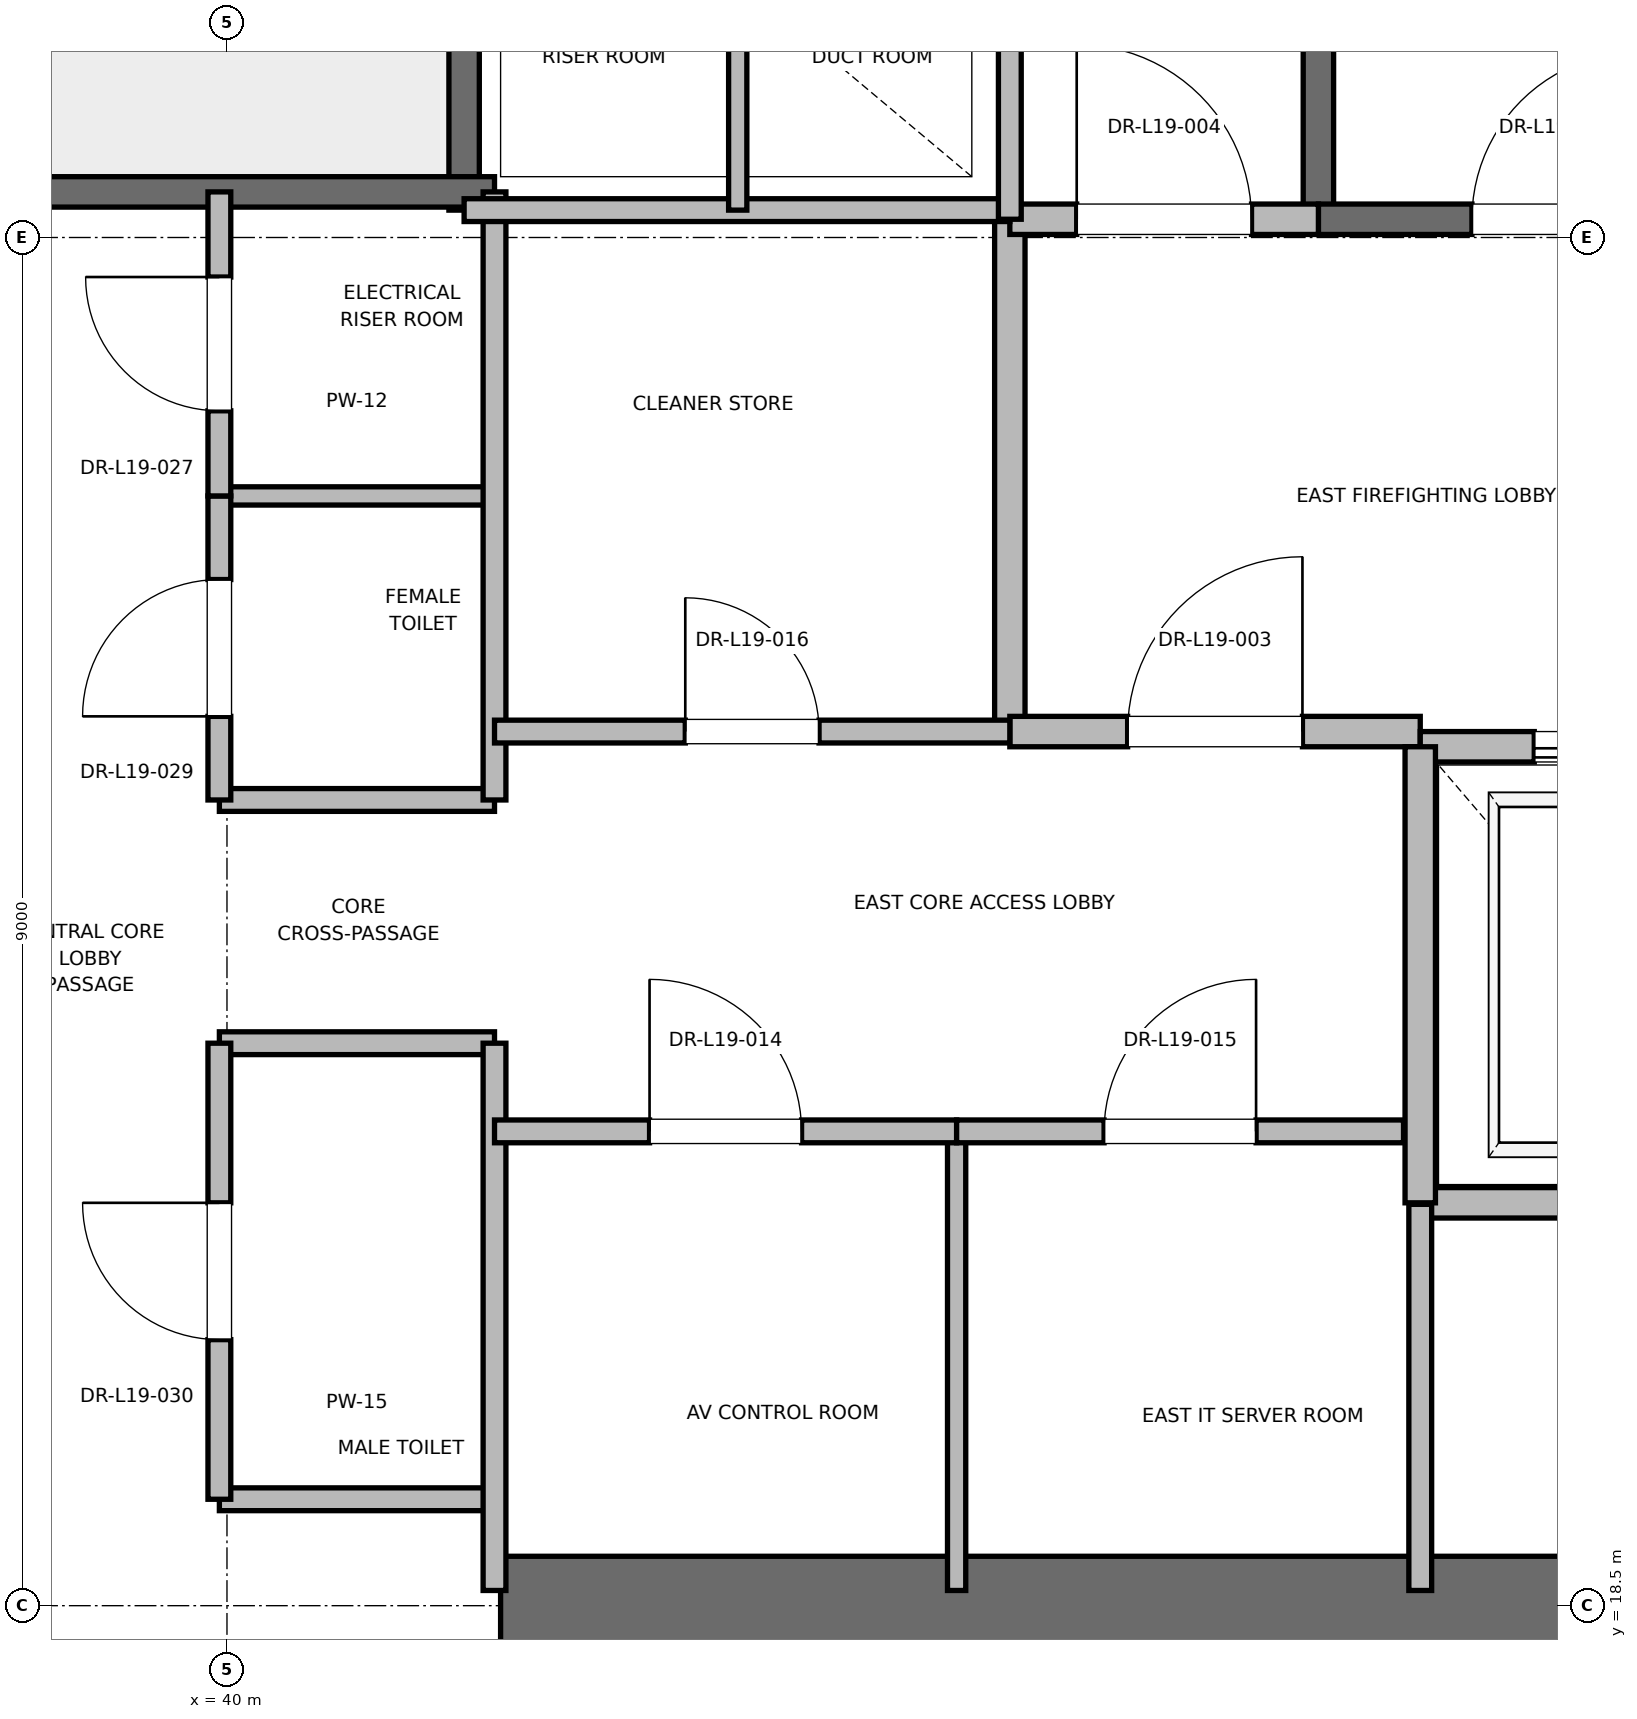
"""IFC4 building model, lengths in metres.
Left out: names, types, materials, properties, quantities, classifications, styles, units other than length and angle.
Written with IfcOpenShell. Run it as: python <this file> out.ifc"""

import sys

from ifc_helpers import new_model, si_unit, direction, frame, frame_2d, origin, place, context, subcontext, project, spatial, rectangle, extrude, element, fill, save


model = new_model("IFC4")
c1 = context("Model", 3, precision=1e-05, world=origin(), true_north=direction((0.0, 1.0)))
c2 = subcontext(c1, "Body", "Model", "MODEL_VIEW")
j1 = project(units=[si_unit("LENGTHUNIT", "METRE"), si_unit("PLANEANGLEUNIT", "RADIAN")], contexts=[c1])
p1 = place(None, origin())
s1 = spatial("IfcSite", under=j1, at=p1, CompositionType="ELEMENT")
p2 = place(p1, origin())
s2 = spatial("IfcBuilding", under=s1, at=p2, CompositionType="ELEMENT")
p3 = place(p2, frame((0.0, 0.0, 83.6)))
s3 = spatial("IfcBuildingStorey", under=s2, at=p3, CompositionType="ELEMENT", Elevation=83.6)
p4 = place(p3, frame((41.8, 18.5, 0.0), z_axis=(0.0, 0.0, 1.0), x_axis=(1.0, 0.0, 0.0)))
e1 = element("IfcWall", 1, at=p4, inside=s3, PredefinedType="SHEAR", context=c2, shape_type="SweptSolid", body=[
    extrude(rectangle(XDim=9.2, YDim=0.65, at=frame_2d((4.6, 0.0))), origin(), (0.0, 0.0, 1.0), 3.76),
])
p5 = place(p3, frame((47.18, 27.62, 0.0), z_axis=(0.0, 0.0, 1.0), x_axis=(0.0, 1.0, 0.0)))
e2 = element("IfcWall", 2, at=p5, inside=s3, PredefinedType="SOLIDWALL", context=c2, shape_type="SweptSolid", body=[
    extrude(rectangle(XDim=8.18, YDim=0.2, at=frame_2d((4.09, 0.0))), origin(), (0.0, 0.0, 1.0), 3.76),
])
p6 = place(p3, frame((47.18, 27.62, 0.0), z_axis=(0.0, 0.0, 1.0), x_axis=(1.0, 0.0, 0.0)))
e3 = element("IfcWall", 3, at=p6, inside=s3, PredefinedType="SOLIDWALL", context=c2, shape_type="SweptSolid", body=[
    extrude(rectangle(XDim=3.12, YDim=0.2, at=frame_2d((1.56, 0.0))), origin(), (0.0, 0.0, 1.0), 3.76),
])
p7 = place(p6, frame((1.01, 0.0, 0.0)))
e4 = element("IfcOpeningElement", 4, at=p7, cuts=e3, PredefinedType="OPENING", context=c2, shape_type="SweptSolid", body=[
    extrude(rectangle(XDim=1.1, YDim=2.15, at=frame_2d((0.55, 1.075))), frame((0.0, 0.1, 0.0), z_axis=(0.0, -1.0, 0.0), x_axis=(1.0, 0.0, 0.0)), (0.0, 0.0, 1.0), 0.2),
])
p8 = place(p3, frame((41.56, 27.68, 0.0), z_axis=(0.0, 0.0, 1.0), x_axis=(0.0, 1.0, 0.0)))
e5 = element("IfcWall", 5, at=p8, inside=s3, PredefinedType="SOLIDWALL", context=c2, shape_type="SweptSolid", body=[
    extrude(rectangle(XDim=8.57, YDim=0.2, at=frame_2d((4.285, 0.0))), origin(), (0.0, 0.0, 1.0), 3.76),
])
p9 = place(p3, frame((38.44, 27.8, 0.0), z_axis=(0.0, 0.0, 1.0), x_axis=(1.0, 0.0, 0.0)))
e6 = element("IfcWall", 6, at=p9, inside=s3, PredefinedType="SOLIDWALL", context=c2, shape_type="SweptSolid", body=[
    extrude(rectangle(XDim=3.32, YDim=0.2, at=frame_2d((1.66, 0.0))), origin(), (0.0, 0.0, 1.0), 3.76),
])
p10 = place(p3, frame((45.15, 24.25, 0.0), z_axis=(0.0, 0.0, 1.0), x_axis=(0.0, 1.0, 0.0)))
e7 = element("IfcWall", 7, at=p10, inside=s3, PredefinedType="PARTITIONING", context=c2, shape_type="SweptSolid", body=[
    extrude(rectangle(XDim=3.37, YDim=0.2, at=frame_2d((1.685, 0.0))), origin(), (0.0, 0.0, 1.0), 3.76),
])
p11 = place(p3, frame((45.15, 24.25, 0.0), z_axis=(0.0, 0.0, 1.0), x_axis=(1.0, 0.0, 0.0)))
e8 = element("IfcWall", 8, at=p11, inside=s3, PredefinedType="PARTITIONING", context=c2, shape_type="SweptSolid", body=[
    extrude(rectangle(XDim=2.7, YDim=0.2, at=frame_2d((1.35, 0.0))), origin(), (0.0, 0.0, 1.0), 3.76),
])
p12 = place(p11, frame((0.775, 0.0, 0.0)))
e9 = element("IfcOpeningElement", 9, at=p12, cuts=e8, PredefinedType="OPENING", context=c2, shape_type="SweptSolid", body=[
    extrude(rectangle(XDim=1.15, YDim=2.2, at=frame_2d((0.575, 1.1))), frame((0.0, 0.1, 0.0), z_axis=(0.0, -1.0, 0.0), x_axis=(1.0, 0.0, 0.0)), (0.0, 0.0, 1.0), 0.2),
])
p13 = place(p3, frame((45.15, 27.62, 0.0), z_axis=(0.0, 0.0, 1.0), x_axis=(1.0, 0.0, 0.0)))
e10 = element("IfcWall", 10, at=p13, inside=s3, PredefinedType="PARTITIONING", context=c2, shape_type="SweptSolid", body=[
    extrude(rectangle(XDim=2.03, YDim=0.2, at=frame_2d((1.015, 0.0))), origin(), (0.0, 0.0, 1.0), 3.76),
])
p14 = place(p13, frame((0.44, 0.0, 0.0)))
e11 = element("IfcOpeningElement", 11, at=p14, cuts=e10, PredefinedType="OPENING", context=c2, shape_type="SweptSolid", body=[
    extrude(rectangle(XDim=1.15, YDim=2.2, at=frame_2d((0.575, 1.1))), frame((0.0, 0.1, 0.0), z_axis=(0.0, -1.0, 0.0), x_axis=(1.0, 0.0, 0.0)), (0.0, 0.0, 1.0), 0.2),
])
p15 = place(p3, frame((47.85, 21.15, 0.0), z_axis=(0.0, 0.0, 1.0), x_axis=(1.0, 0.0, 0.0)))
e12 = element("IfcWall", 12, at=p15, inside=s3, PredefinedType="SOLIDWALL", context=c2, shape_type="SweptSolid", body=[
    extrude(rectangle(XDim=2.6, YDim=0.2, at=frame_2d((1.3, 0.0))), origin(), (0.0, 0.0, 1.0), 3.76),
])
p16 = place(p3, frame((50.45, 24.15, 0.0), z_axis=(0.0, 0.0, 1.0), x_axis=(-1.0, 0.0, 0.0)))
e13 = element("IfcWall", 13, at=p16, inside=s3, PredefinedType="SOLIDWALL", context=c2, shape_type="SweptSolid", body=[
    extrude(rectangle(XDim=2.6, YDim=0.2, at=frame_2d((1.3, 0.0))), origin(), (0.0, 0.0, 1.0), 2.54),
])
p17 = place(p16, frame((0.75, 0.0, 0.0)))
e14 = element("IfcOpeningElement", 14, at=p17, cuts=e13, PredefinedType="OPENING", context=c2, shape_type="SweptSolid", body=[
    extrude(rectangle(XDim=1.1, YDim=2.2, at=frame_2d((0.55, 1.1))), frame((0.0, 0.1, 0.0), z_axis=(0.0, -1.0, 0.0), x_axis=(1.0, 0.0, 0.0)), (0.0, 0.0, 1.0), 0.2),
])
p18 = place(p3, frame((47.85, 24.15, 0.0), z_axis=(0.0, 0.0, 1.0), x_axis=(0.0, -1.0, 0.0)))
e15 = element("IfcWall", 15, at=p18, inside=s3, PredefinedType="SOLIDWALL", context=c2, shape_type="SweptSolid", body=[
    extrude(rectangle(XDim=3.0, YDim=0.2, at=frame_2d((1.5, 0.0))), origin(), (0.0, 0.0, 1.0), 3.76),
])
for number, where, z_axis, x_axis in (
    (16, (39.95, 19.2, 0.0), (0.0, 0.0, 1.0), (1.0, 0.0, 0.0)),
    (17, (39.95, 22.2, 0.0), (0.0, 0.0, 1.0), (1.0, 0.0, 0.0)),
    (18, (39.95, 23.8, 0.0), (0.0, 0.0, 1.0), (1.0, 0.0, 0.0)),
):
    element("IfcWall", number, at=place(p3, frame(where, z_axis=z_axis, x_axis=x_axis)), inside=s3, PredefinedType="PARTITIONING", context=c2, shape_type="SweptSolid", body=[
        extrude(rectangle(XDim=1.81, YDim=0.15, at=frame_2d((0.905, 0.0))), origin(), (0.0, 0.0, 1.0), 2.85),
    ])
p19 = place(p3, frame((39.95, 25.8, 0.0), z_axis=(0.0, 0.0, 1.0), x_axis=(1.0, 0.0, 0.0)))
e19 = element("IfcWall", 19, at=p19, inside=s3, PredefinedType="PARTITIONING", context=c2, shape_type="SweptSolid", body=[
    extrude(rectangle(XDim=1.81, YDim=0.12, at=frame_2d((0.905, 0.0))), origin(), (0.0, 0.0, 1.0), 2.85),
])
p20 = place(p3, frame((41.76, 18.6, 0.0), z_axis=(0.0, 0.0, 1.0), x_axis=(0.0, 1.0, 0.0)))
e20 = element("IfcWall", 20, at=p20, inside=s3, PredefinedType="PARTITIONING", context=c2, shape_type="SweptSolid", body=[
    extrude(rectangle(XDim=3.6, YDim=0.15, at=frame_2d((1.8, 0.0))), origin(), (0.0, 0.0, 1.0), 2.54),
])
p21 = place(p3, frame((41.76, 23.8, 0.0), z_axis=(0.0, 0.0, 1.0), x_axis=(0.0, 1.0, 0.0)))
e21 = element("IfcWall", 21, at=p21, inside=s3, PredefinedType="PARTITIONING", context=c2, shape_type="SweptSolid", body=[
    extrude(rectangle(XDim=4.0, YDim=0.15, at=frame_2d((2.0, 0.0))), origin(), (0.0, 0.0, 1.0), 2.85),
])
p22 = place(p3, frame((39.95, 19.2, 0.0), z_axis=(0.0, 0.0, 1.0), x_axis=(0.0, 1.0, 0.0)))
e22 = element("IfcWall", 22, at=p22, inside=s3, PredefinedType="PARTITIONING", context=c2, shape_type="SweptSolid", body=[
    extrude(rectangle(XDim=3.0, YDim=0.15, at=frame_2d((1.5, 0.0))), origin(), (0.0, 0.0, 1.0), 2.85),
])
p23 = place(p22, frame((1.05, 0.0, 0.0)))
e23 = element("IfcOpeningElement", 23, at=p23, cuts=e22, PredefinedType="OPENING", context=c2, shape_type="SweptSolid", body=[
    extrude(rectangle(XDim=0.9, YDim=2.1, at=frame_2d((0.45, 1.05))), frame((0.0, 0.075, 0.0), z_axis=(0.0, -1.0, 0.0), x_axis=(1.0, 0.0, 0.0)), (0.0, 0.0, 1.0), 0.15),
])
p24 = place(p3, frame((39.95, 23.8, 0.0), z_axis=(0.0, 0.0, 1.0), x_axis=(0.0, 1.0, 0.0)))
e24 = element("IfcWall", 24, at=p24, inside=s3, PredefinedType="PARTITIONING", context=c2, shape_type="SweptSolid", body=[
    extrude(rectangle(XDim=2.0, YDim=0.15, at=frame_2d((1.0, 0.0))), origin(), (0.0, 0.0, 1.0), 2.85),
])
p25 = place(p24, frame((0.55, 0.0, 0.0)))
e25 = element("IfcOpeningElement", 25, at=p25, cuts=e24, PredefinedType="OPENING", context=c2, shape_type="SweptSolid", body=[
    extrude(rectangle(XDim=0.9, YDim=2.1, at=frame_2d((0.45, 1.05))), frame((0.0, 0.075, 0.0), z_axis=(0.0, -1.0, 0.0), x_axis=(1.0, 0.0, 0.0)), (0.0, 0.0, 1.0), 0.15),
])
p26 = place(p3, frame((39.95, 25.8, 0.0), z_axis=(0.0, 0.0, 1.0), x_axis=(0.0, 1.0, 0.0)))
e26 = element("IfcWall", 26, at=p26, inside=s3, PredefinedType="PARTITIONING", context=c2, shape_type="SweptSolid", body=[
    extrude(rectangle(XDim=2.0, YDim=0.15, at=frame_2d((1.0, 0.0))), origin(), (0.0, 0.0, 1.0), 2.85),
])
p27 = place(p26, frame((0.56, 0.0, 0.0)))
e27 = element("IfcOpeningElement", 27, at=p27, cuts=e26, PredefinedType="OPENING", context=c2, shape_type="SweptSolid", body=[
    extrude(rectangle(XDim=0.88, YDim=2.1, at=frame_2d((0.44, 1.05))), frame((0.0, 0.075, 0.0), z_axis=(0.0, -1.0, 0.0), x_axis=(1.0, 0.0, 0.0)), (0.0, 0.0, 1.0), 0.15),
])
p28 = place(p3, frame((41.56, 27.68, 0.0), z_axis=(0.0, 0.0, 1.0), x_axis=(1.0, 0.0, 0.0)))
e28 = element("IfcWall", 28, at=p28, inside=s3, PredefinedType="PARTITIONING", context=c2, shape_type="SweptSolid", body=[
    extrude(rectangle(XDim=3.59, YDim=0.15, at=frame_2d((1.795, 0.0))), origin(), (0.0, 0.0, 1.0), 2.85),
])
p29 = place(p3, frame((47.85, 18.6, 0.0), z_axis=(0.0, 0.0, 1.0), x_axis=(0.0, 1.0, 0.0)))
e29 = element("IfcWall", 29, at=p29, inside=s3, PredefinedType="PARTITIONING", context=c2, shape_type="SweptSolid", body=[
    extrude(rectangle(XDim=2.54, YDim=0.15, at=frame_2d((1.27, 0.0))), origin(), (0.0, 0.0, 1.0), 2.85),
])
p30 = place(p3, frame((44.8, 18.6, 0.0), z_axis=(0.0, 0.0, 1.0), x_axis=(0.0, 1.0, 0.0)))
e30 = element("IfcWall", 30, at=p30, inside=s3, PredefinedType="PARTITIONING", context=c2, shape_type="SweptSolid", body=[
    extrude(rectangle(XDim=3.02, YDim=0.12, at=frame_2d((1.51, 0.0))), origin(), (0.0, 0.0, 1.0), 2.85),
])
p31 = place(p3, frame((41.76, 21.62, 0.0), z_axis=(0.0, 0.0, 1.0), x_axis=(1.0, 0.0, 0.0)))
e31 = element("IfcWall", 31, at=p31, inside=s3, PredefinedType="PARTITIONING", context=c2, shape_type="SweptSolid", body=[
    extrude(rectangle(XDim=3.04, YDim=0.15, at=frame_2d((1.52, 0.0))), origin(), (0.0, 0.0, 1.0), 2.85),
])
p32 = place(p31, frame((1.02, 0.0, 0.0)))
e32 = element("IfcOpeningElement", 32, at=p32, cuts=e31, PredefinedType="OPENING", context=c2, shape_type="SweptSolid", body=[
    extrude(rectangle(XDim=1.0, YDim=2.15, at=frame_2d((0.5, 1.075))), frame((0.0, 0.075, 0.0), z_axis=(0.0, -1.0, 0.0), x_axis=(1.0, 0.0, 0.0)), (0.0, 0.0, 1.0), 0.15),
])
p33 = place(p3, frame((44.8, 21.62, 0.0), z_axis=(0.0, 0.0, 1.0), x_axis=(1.0, 0.0, 0.0)))
e33 = element("IfcWall", 33, at=p33, inside=s3, PredefinedType="PARTITIONING", context=c2, shape_type="SweptSolid", body=[
    extrude(rectangle(XDim=2.94, YDim=0.15, at=frame_2d((1.47, 0.0))), origin(), (0.0, 0.0, 1.0), 2.85),
])
p34 = place(p33, frame((0.97, 0.0, 0.0)))
e34 = element("IfcOpeningElement", 34, at=p34, cuts=e33, PredefinedType="OPENING", context=c2, shape_type="SweptSolid", body=[
    extrude(rectangle(XDim=1.0, YDim=2.15, at=frame_2d((0.5, 1.075))), frame((0.0, 0.075, 0.0), z_axis=(0.0, -1.0, 0.0), x_axis=(1.0, 0.0, 0.0)), (0.0, 0.0, 1.0), 0.15),
])
p35 = place(p3, frame((41.76, 24.25, 0.0), z_axis=(0.0, 0.0, 1.0), x_axis=(1.0, 0.0, 0.0)))
e35 = element("IfcWall", 35, at=p35, inside=s3, PredefinedType="PARTITIONING", context=c2, shape_type="SweptSolid", body=[
    extrude(rectangle(XDim=3.39, YDim=0.15, at=frame_2d((1.695, 0.0))), origin(), (0.0, 0.0, 1.0), 2.85),
])
p36 = place(p35, frame((1.255, 0.0, 0.0)))
e36 = element("IfcOpeningElement", 36, at=p36, cuts=e35, PredefinedType="OPENING", context=c2, shape_type="SweptSolid", body=[
    extrude(rectangle(XDim=0.88, YDim=2.1, at=frame_2d((0.44, 1.05))), frame((0.0, 0.075, 0.0), z_axis=(0.0, -1.0, 0.0), x_axis=(1.0, 0.0, 0.0)), (0.0, 0.0, 1.0), 0.15),
])
p37 = place(p3, frame((45.15, 27.62, 0.0), z_axis=(0.0, 0.0, 1.0), x_axis=(0.0, 1.0, 0.0)))
e37 = element("IfcWall", 37, at=p37, inside=s3, PredefinedType="PARTITIONING", context=c2, shape_type="SweptSolid", body=[
    extrude(rectangle(XDim=3.1, YDim=0.15, at=frame_2d((1.55, 0.0))), origin(), (0.0, 0.0, 1.0), 2.85),
])
p38 = place(p3, frame((43.36, 27.68, 0.0), z_axis=(0.0, 0.0, 1.0), x_axis=(0.0, 1.0, 0.0)))
e38 = element("IfcWall", 38, at=p38, inside=s3, PredefinedType="PARTITIONING", context=c2, shape_type="SweptSolid", body=[
    extrude(rectangle(XDim=3.04, YDim=0.12, at=frame_2d((1.52, 0.0))), origin(), (0.0, 0.0, 1.0), 2.85),
])
p39 = place(p7, origin())
e39 = element("IfcDoor", 39, at=p39, inside=s3, OperationType="SINGLE_SWING_RIGHT", PredefinedType="DOOR", context=c2, shape_type="SweptSolid", body=[
    extrude(rectangle(XDim=1.1, YDim=2.15, at=frame_2d((0.55, 1.075))), frame((0.0, 0.025, 0.0), z_axis=(0.0, -1.0, 0.0), x_axis=(1.0, 0.0, 0.0)), (0.0, 0.0, 1.0), 0.05),
])
fill(e4, e39)
p40 = place(p12, origin())
e40 = element("IfcDoor", 40, at=p40, inside=s3, OperationType="SINGLE_SWING_RIGHT", PredefinedType="DOOR", context=c2, shape_type="SweptSolid", body=[
    extrude(rectangle(XDim=1.15, YDim=2.2, at=frame_2d((0.575, 1.1))), frame((0.0, 0.025, 0.0), z_axis=(0.0, -1.0, 0.0), x_axis=(1.0, 0.0, 0.0)), (0.0, 0.0, 1.0), 0.05),
])
fill(e9, e40)
p41 = place(p14, origin())
e41 = element("IfcDoor", 41, at=p41, inside=s3, OperationType="SINGLE_SWING_LEFT", PredefinedType="DOOR", context=c2, shape_type="SweptSolid", body=[
    extrude(rectangle(XDim=1.15, YDim=2.2, at=frame_2d((0.575, 1.1))), frame((0.0, 0.025, 0.0), z_axis=(0.0, -1.0, 0.0), x_axis=(1.0, 0.0, 0.0)), (0.0, 0.0, 1.0), 0.05),
])
fill(e11, e41)
p42 = place(p17, origin())
e42 = element("IfcDoor", 42, at=p42, inside=s3, OperationType="SLIDING_TO_RIGHT", PredefinedType="DOOR", context=c2, shape_type="SweptSolid", body=[
    extrude(rectangle(XDim=1.1, YDim=2.2, at=frame_2d((0.55, 1.1))), frame((0.0, 0.025, 0.0), z_axis=(0.0, -1.0, 0.0), x_axis=(1.0, 0.0, 0.0)), (0.0, 0.0, 1.0), 0.05),
])
fill(e14, e42)
p43 = place(p23, origin())
e43 = element("IfcDoor", 43, at=p43, inside=s3, OperationType="SINGLE_SWING_RIGHT", PredefinedType="DOOR", context=c2, shape_type="SweptSolid", body=[
    extrude(rectangle(XDim=0.9, YDim=2.1, at=frame_2d((0.45, 1.05))), frame((0.0, 0.025, 0.0), z_axis=(0.0, -1.0, 0.0), x_axis=(1.0, 0.0, 0.0)), (0.0, 0.0, 1.0), 0.05),
])
fill(e23, e43)
p44 = place(p25, origin())
e44 = element("IfcDoor", 44, at=p44, inside=s3, OperationType="SINGLE_SWING_LEFT", PredefinedType="DOOR", context=c2, shape_type="SweptSolid", body=[
    extrude(rectangle(XDim=0.9, YDim=2.1, at=frame_2d((0.45, 1.05))), frame((0.0, 0.025, 0.0), z_axis=(0.0, -1.0, 0.0), x_axis=(1.0, 0.0, 0.0)), (0.0, 0.0, 1.0), 0.05),
])
fill(e25, e44)
p45 = place(p27, origin())
e45 = element("IfcDoor", 45, at=p45, inside=s3, OperationType="SINGLE_SWING_RIGHT", PredefinedType="DOOR", context=c2, shape_type="SweptSolid", body=[
    extrude(rectangle(XDim=0.88, YDim=2.1, at=frame_2d((0.44, 1.05))), frame((0.0, 0.025, 0.0), z_axis=(0.0, -1.0, 0.0), x_axis=(1.0, 0.0, 0.0)), (0.0, 0.0, 1.0), 0.05),
])
fill(e27, e45)
p46 = place(p32, origin())
e46 = element("IfcDoor", 46, at=p46, inside=s3, OperationType="SINGLE_SWING_LEFT", PredefinedType="DOOR", context=c2, shape_type="SweptSolid", body=[
    extrude(rectangle(XDim=1.0, YDim=2.15, at=frame_2d((0.5, 1.075))), frame((0.0, 0.025, 0.0), z_axis=(0.0, -1.0, 0.0), x_axis=(1.0, 0.0, 0.0)), (0.0, 0.0, 1.0), 0.05),
])
fill(e32, e46)
p47 = place(p34, origin())
e47 = element("IfcDoor", 47, at=p47, inside=s3, OperationType="SINGLE_SWING_RIGHT", PredefinedType="DOOR", context=c2, shape_type="SweptSolid", body=[
    extrude(rectangle(XDim=1.0, YDim=2.15, at=frame_2d((0.5, 1.075))), frame((0.0, 0.025, 0.0), z_axis=(0.0, -1.0, 0.0), x_axis=(1.0, 0.0, 0.0)), (0.0, 0.0, 1.0), 0.05),
])
fill(e34, e47)
p48 = place(p36, origin())
e48 = element("IfcDoor", 48, at=p48, inside=s3, OperationType="SINGLE_SWING_LEFT", PredefinedType="DOOR", context=c2, shape_type="SweptSolid", body=[
    extrude(rectangle(XDim=0.88, YDim=2.1, at=frame_2d((0.44, 1.05))), frame((0.0, 0.025, 0.0), z_axis=(0.0, -1.0, 0.0), x_axis=(1.0, 0.0, 0.0)), (0.0, 0.0, 1.0), 0.05),
])
fill(e36, e48)
save(model, sys.argv[1])
